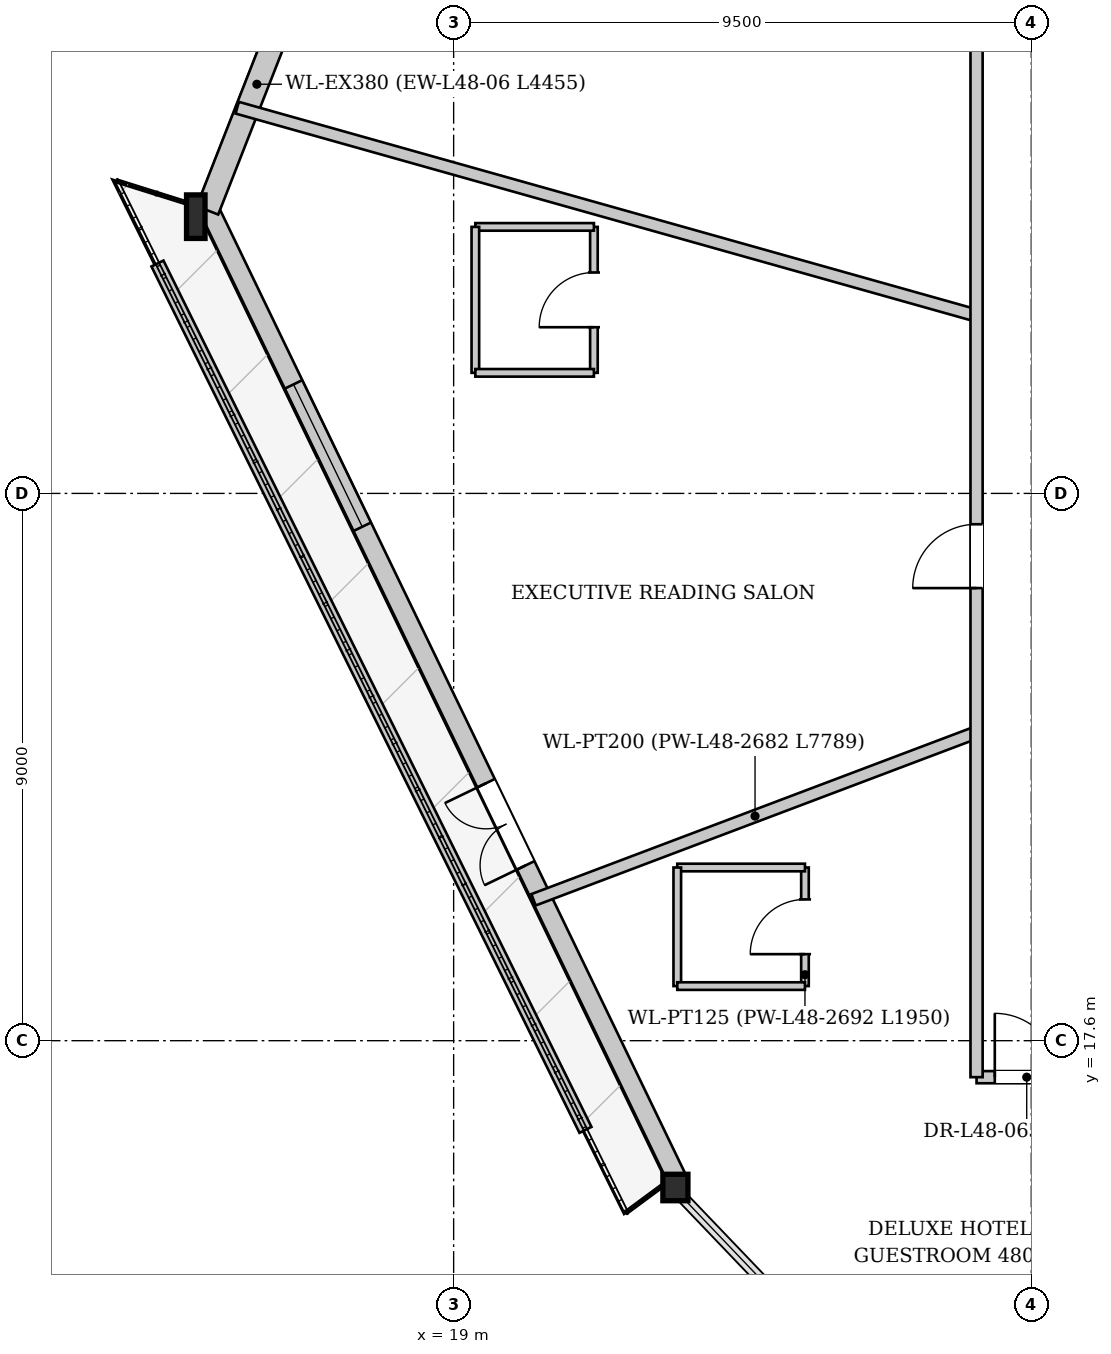
"""IFC4 building model, lengths in metres.
Left out: names, types, materials, properties, quantities, classifications, styles, units other than length and angle.
Written with IfcOpenShell. Run it as: python <this file> out.ifc"""

import sys

from ifc_helpers import new_model, si_unit, direction, frame, frame_2d, origin, origin_2d, place, context, subcontext, project, spatial, rectangle, i_section, extrude, source, transform, mapped, element, fill, save


model = new_model("IFC4")
c1 = context("Model", 3, precision=1e-05, world=origin(), true_north=direction((0.0, 1.0)))
c2 = subcontext(c1, "Body", "Model", "MODEL_VIEW")
j1 = project(units=[si_unit("LENGTHUNIT", "METRE"), si_unit("PLANEANGLEUNIT", "RADIAN")], contexts=[c1])
p1 = place(None, origin())
s1 = spatial("IfcSite", under=j1, at=p1, CompositionType="ELEMENT")
p2 = place(p1, origin())
s2 = spatial("IfcBuilding", under=s1, at=p2, CompositionType="ELEMENT")
p3 = place(p2, frame((0.0, 0.0, 182.1)))
s3 = spatial("IfcBuildingStorey", under=s2, at=p3, CompositionType="ELEMENT", Elevation=182.1)
m1 = source(origin(), c2, "Body", "SweptSolid", [
    extrude(i_section(OverallWidth=0.304, OverallDepth=0.716, WebThickness=0.021, FlangeThickness=0.04, at=origin_2d()), origin(), (0.0, 0.0, 1.0), 3.403),
])
p4 = place(p3, frame((14.774, 31.325, 0.0), z_axis=(-0.008968101403, -0.102021121565, 0.994741807663), x_axis=(0.996158659499, -0.087566689478, 0.0)))
e1 = element("IfcColumn", 1, at=p4, inside=s3, PredefinedType="COLUMN", context=c2, shape_type="MappedRepresentation", body=[
    mapped(m1, transform((0.0, 0.0, 0.0), x_axis=(1.0, 0.0, 0.0), y_axis=(0.0, 1.0, 0.0), z_axis=(0.0, 0.0, 1.0), scale=1.0)),
])
m2 = source(origin(), c2, "Body", "SweptSolid", [
    extrude(i_section(OverallWidth=0.412, OverallDepth=0.435, WebThickness=0.031, FlangeThickness=0.05, at=origin_2d()), origin(), (0.0, 0.0, 1.0), 3.4),
])
p5 = place(p3, frame((22.519, 15.279, 0.0), z_axis=(0.07518697246, -0.054648792781, 0.995670843512), x_axis=(0.587941984646, 0.808903098455, 0.0)))
e2 = element("IfcColumn", 2, at=p5, inside=s3, PredefinedType="COLUMN", context=c2, shape_type="MappedRepresentation", body=[
    mapped(m2, transform((0.0, 0.0, 0.0), x_axis=(1.0, 0.0, 0.0), y_axis=(0.0, 1.0, 0.0), z_axis=(0.0, 0.0, 1.0), scale=1.0)),
])
p6 = place(p3, frame((22.664, 15.348, 0.0), z_axis=(0.0, 0.0, 1.0), x_axis=(-0.434690054068, 0.900580122418, 0.0)))
e3 = element("IfcWall", 3, at=p6, inside=s3, PredefinedType="SOLIDWALL", context=c2, shape_type="SweptSolid", body=[
    extrude(rectangle(XDim=17.818, YDim=0.32, at=frame_2d((8.909, 0.0))), origin(), (0.0, 0.0, 1.0), 2.722),
])
p7 = place(p6, frame((5.702, 0.0, 0.0)))
e4 = element("IfcOpeningElement", 4, at=p7, cuts=e3, PredefinedType="OPENING", context=c2, shape_type="SweptSolid", body=[
    extrude(rectangle(XDim=1.5, YDim=2.3, at=frame_2d((0.75, 1.15))), frame((0.0, 0.17, 0.0), z_axis=(0.0, -1.0, 0.0), x_axis=(1.0, 0.0, 0.0)), (0.0, 0.0, 1.0), 0.34),
])
p8 = place(p6, frame((11.885, 0.0, 0.252)))
e5 = element("IfcOpeningElement", 5, at=p8, cuts=e3, PredefinedType="OPENING", context=c2, shape_type="SweptSolid", body=[
    extrude(rectangle(XDim=2.6, YDim=2.35, at=frame_2d((1.3, 1.175))), frame((0.0, 0.17, 0.0), z_axis=(0.0, -1.0, 0.0), x_axis=(1.0, 0.0, 0.0)), (0.0, 0.0, 1.0), 0.34),
])
p9 = place(p3, frame((14.951, 31.255, 0.0), z_axis=(0.0, 0.0, 1.0), x_axis=(0.364851869686, 0.931065579423, 0.0)))
e6 = element("IfcWall", 6, at=p9, inside=s3, PredefinedType="SOLIDWALL", context=c2, shape_type="SweptSolid", body=[
    extrude(rectangle(XDim=4.455, YDim=0.38, at=frame_2d((2.227, 0.0))), origin(), (0.0, 0.0, 1.0), 2.722),
])
p10 = place(p3, frame((14.129, 30.381, 0.0), z_axis=(0.0, 0.0, 1.0), x_axis=(0.442956113231, -0.896543296083, 0.0)))
e7 = element("IfcWall", 7, at=p10, inside=s3, PredefinedType="PARAPET", context=c2, shape_type="SweptSolid", body=[
    extrude(rectangle(XDim=15.892, YDim=0.22, at=frame_2d((7.946, 0.0))), origin(), (0.0, 0.0, 1.0), 0.3),
])
p11 = place(p3, frame((27.6, 22.67, 0.0), z_axis=(0.0, 0.0, 1.0), x_axis=(-0.935445148769, -0.353471885225, 0.0)))
e8 = element("IfcWall", 8, at=p11, inside=s3, PredefinedType="PARTITIONING", context=c2, shape_type="SweptSolid", body=[
    extrude(rectangle(XDim=7.789, YDim=0.2, at=frame_2d((3.895, 0.0))), origin(), (0.0, 0.0, 1.0), 3.33),
])
p12 = place(p3, frame((31.791, 17.0, 0.0), z_axis=(0.0, 0.0, 1.0), x_axis=(-0.543103391012, -0.839665830358, 0.0)))
e9 = element("IfcWall", 9, at=p12, inside=s3, PredefinedType="PARTITIONING", context=c2, shape_type="SweptSolid", body=[
    extrude(rectangle(XDim=8.078, YDim=0.2, at=frame_2d((4.039, 0.0))), origin(), (0.0, 0.0, 1.0), 3.33),
])
p13 = place(p3, frame((27.6, 29.524, 0.0), z_axis=(0.0, 0.0, 1.0), x_axis=(-0.962669357106, 0.270680085873, 0.0)))
e10 = element("IfcWall", 10, at=p13, inside=s3, PredefinedType="PARTITIONING", context=c2, shape_type="SweptSolid", body=[
    extrude(rectangle(XDim=12.631, YDim=0.2, at=frame_2d((6.315, 0.0))), origin(), (0.0, 0.0, 1.0), 3.33),
])
p14 = place(p3, frame((24.778, 18.498, 0.0), z_axis=(0.0, 0.0, 1.0), x_axis=(0.0, 1.0, 0.0)))
e11 = element("IfcWall", 11, at=p14, inside=s3, PredefinedType="PARTITIONING", context=c2, shape_type="SweptSolid", body=[
    extrude(rectangle(XDim=1.95, YDim=0.125, at=frame_2d((0.975, 0.0))), origin(), (0.0, 0.0, 1.0), 3.015),
])
p15 = place(p14, frame((0.525, 0.0, 0.0)))
e12 = element("IfcOpeningElement", 12, at=p15, cuts=e11, PredefinedType="OPENING", context=c2, shape_type="SweptSolid", body=[
    extrude(rectangle(XDim=0.9, YDim=2.1, at=frame_2d((0.45, 1.05))), frame((0.0, 0.073, 0.0), z_axis=(0.0, -1.0, 0.0), x_axis=(1.0, 0.0, 0.0)), (0.0, 0.0, 1.0), 0.145),
])
p16 = place(p3, frame((24.778, 20.448, 0.0), z_axis=(0.0, 0.0, 1.0), x_axis=(-1.0, 0.0, 0.0)))
e13 = element("IfcWall", 13, at=p16, inside=s3, PredefinedType="PARTITIONING", context=c2, shape_type="SweptSolid", body=[
    extrude(rectangle(XDim=2.1, YDim=0.125, at=frame_2d((1.05, 0.0))), origin(), (0.0, 0.0, 1.0), 3.33),
])
p17 = place(p3, frame((22.678, 20.448, 0.0), z_axis=(0.0, 0.0, 1.0), x_axis=(0.0, -1.0, 0.0)))
e14 = element("IfcWall", 14, at=p17, inside=s3, PredefinedType="PARTITIONING", context=c2, shape_type="SweptSolid", body=[
    extrude(rectangle(XDim=1.95, YDim=0.125, at=frame_2d((0.975, 0.0))), origin(), (0.0, 0.0, 1.0), 3.33),
])
p18 = place(p3, frame((22.678, 18.498, 0.0), z_axis=(0.0, 0.0, 1.0), x_axis=(1.0, 0.0, 0.0)))
e15 = element("IfcWall", 15, at=p18, inside=s3, PredefinedType="PARTITIONING", context=c2, shape_type="SweptSolid", body=[
    extrude(rectangle(XDim=2.1, YDim=0.125, at=frame_2d((1.05, 0.0))), origin(), (0.0, 0.0, 1.0), 3.33),
])
p19 = place(p3, frame((21.307, 28.583, 0.0), z_axis=(0.0, 0.0, 1.0), x_axis=(0.0, 1.0, 0.0)))
e16 = element("IfcWall", 16, at=p19, inside=s3, PredefinedType="PARTITIONING", context=c2, shape_type="SweptSolid", body=[
    extrude(rectangle(XDim=2.4, YDim=0.125, at=frame_2d((1.2, 0.0))), origin(), (0.0, 0.0, 1.0), 3.015),
])
p20 = place(p19, frame((0.75, 0.0, 0.0)))
e17 = element("IfcOpeningElement", 17, at=p20, cuts=e16, PredefinedType="OPENING", context=c2, shape_type="SweptSolid", body=[
    extrude(rectangle(XDim=0.9, YDim=2.1, at=frame_2d((0.45, 1.05))), frame((0.0, 0.073, 0.0), z_axis=(0.0, -1.0, 0.0), x_axis=(1.0, 0.0, 0.0)), (0.0, 0.0, 1.0), 0.145),
])
p21 = place(p3, frame((21.307, 30.983, 0.0), z_axis=(0.0, 0.0, 1.0), x_axis=(-1.0, 0.0, 0.0)))
e18 = element("IfcWall", 18, at=p21, inside=s3, PredefinedType="PARTITIONING", context=c2, shape_type="SweptSolid", body=[
    extrude(rectangle(XDim=1.95, YDim=0.125, at=frame_2d((0.975, 0.0))), origin(), (0.0, 0.0, 1.0), 3.33),
])
p22 = place(p3, frame((19.357, 30.983, 0.0), z_axis=(0.0, 0.0, 1.0), x_axis=(0.0, -1.0, 0.0)))
e19 = element("IfcWall", 19, at=p22, inside=s3, PredefinedType="PARTITIONING", context=c2, shape_type="SweptSolid", body=[
    extrude(rectangle(XDim=2.4, YDim=0.125, at=frame_2d((1.2, 0.0))), origin(), (0.0, 0.0, 1.0), 3.33),
])
p23 = place(p3, frame((19.357, 28.583, 0.0), z_axis=(0.0, 0.0, 1.0), x_axis=(1.0, 0.0, 0.0)))
e20 = element("IfcWall", 20, at=p23, inside=s3, PredefinedType="PARTITIONING", context=c2, shape_type="SweptSolid", body=[
    extrude(rectangle(XDim=1.95, YDim=0.125, at=frame_2d((0.975, 0.0))), origin(), (0.0, 0.0, 1.0), 3.33),
])
p24 = place(p3, frame((27.6, 17.0, 0.0), z_axis=(0.0, 0.0, 1.0), x_axis=(1.0, 0.0, 0.0)))
e21 = element("IfcWall", 21, at=p24, inside=s3, PredefinedType="PARTITIONING", context=c2, shape_type="SweptSolid", body=[
    extrude(rectangle(XDim=20.8, YDim=0.2, at=frame_2d((10.4, 0.0))), origin(), (0.0, 0.0, 1.0), 3.33),
])
p25 = place(p24, frame((0.3, 0.0, 0.0)))
e22 = element("IfcOpeningElement", 22, at=p25, cuts=e21, PredefinedType="OPENING", context=c2, shape_type="SweptSolid", body=[
    extrude(rectangle(XDim=1.05, YDim=2.2, at=frame_2d((0.525, 1.1))), frame((0.0, 0.11, 0.0), z_axis=(0.0, -1.0, 0.0), x_axis=(1.0, 0.0, 0.0)), (0.0, 0.0, 1.0), 0.22),
])
p26 = place(p24, frame((6.215, 0.0, 0.0)))
e23 = element("IfcOpeningElement", 23, at=p26, cuts=e21, PredefinedType="OPENING", context=c2, shape_type="SweptSolid", body=[
    extrude(rectangle(XDim=1.05, YDim=2.2, at=frame_2d((0.525, 1.1))), frame((0.0, 0.11, 0.0), z_axis=(0.0, -1.0, 0.0), x_axis=(1.0, 0.0, 0.0)), (0.0, 0.0, 1.0), 0.22),
])
p27 = place(p24, frame((14.998, 0.0, 0.0)))
e24 = element("IfcOpeningElement", 24, at=p27, cuts=e21, PredefinedType="OPENING", context=c2, shape_type="SweptSolid", body=[
    extrude(rectangle(XDim=1.05, YDim=2.2, at=frame_2d((0.525, 1.1))), frame((0.0, 0.11, 0.0), z_axis=(0.0, -1.0, 0.0), x_axis=(1.0, 0.0, 0.0)), (0.0, 0.0, 1.0), 0.22),
])
p28 = place(p24, frame((19.45, 0.0, 0.0)))
e25 = element("IfcOpeningElement", 25, at=p28, cuts=e21, PredefinedType="OPENING", context=c2, shape_type="SweptSolid", body=[
    extrude(rectangle(XDim=1.05, YDim=2.2, at=frame_2d((0.525, 1.1))), frame((0.0, 0.11, 0.0), z_axis=(0.0, -1.0, 0.0), x_axis=(1.0, 0.0, 0.0)), (0.0, 0.0, 1.0), 0.22),
])
p29 = place(p3, frame((27.6, 17.0, 0.0), z_axis=(0.0, 0.0, 1.0), x_axis=(0.0, 1.0, 0.0)))
e26 = element("IfcWall", 26, at=p29, inside=s3, PredefinedType="PARTITIONING", context=c2, shape_type="SweptSolid", body=[
    extrude(rectangle(XDim=19.2, YDim=0.2, at=frame_2d((9.6, 0.0))), origin(), (0.0, 0.0, 1.0), 3.33),
])
p30 = place(p29, frame((17.85, 0.0, 0.0)))
e27 = element("IfcOpeningElement", 27, at=p30, cuts=e26, PredefinedType="OPENING", context=c2, shape_type="SweptSolid", body=[
    extrude(rectangle(XDim=1.05, YDim=2.2, at=frame_2d((0.525, 1.1))), frame((0.0, 0.11, 0.0), z_axis=(0.0, -1.0, 0.0), x_axis=(1.0, 0.0, 0.0)), (0.0, 0.0, 1.0), 0.22),
])
p31 = place(p29, frame((8.043, 0.0, 0.0)))
e28 = element("IfcOpeningElement", 28, at=p31, cuts=e26, PredefinedType="OPENING", context=c2, shape_type="SweptSolid", body=[
    extrude(rectangle(XDim=1.05, YDim=2.2, at=frame_2d((0.525, 1.1))), frame((0.0, 0.11, 0.0), z_axis=(0.0, -1.0, 0.0), x_axis=(1.0, 0.0, 0.0)), (0.0, 0.0, 1.0), 0.22),
])
m3 = source(origin(), c2, "Body", "SweptSolid", [
    extrude(rectangle(XDim=1.5, YDim=2.3, at=frame_2d((0.75, 1.15))), frame((0.0, 0.025, 0.0), z_axis=(0.0, -1.0, 0.0), x_axis=(1.0, 0.0, 0.0)), (0.0, 0.0, 1.0), 0.05),
])
p32 = place(p7, origin())
e29 = element("IfcDoor", 29, at=p32, inside=s3, OperationType="DOUBLE_DOOR_SINGLE_SWING", PredefinedType="DOOR", context=c2, shape_type="MappedRepresentation", body=[
    mapped(m3, transform((0.0, 0.0, 0.0), x_axis=(1.0, 0.0, 0.0), y_axis=(0.0, 1.0, 0.0), z_axis=(0.0, 0.0, 1.0), scale=1.0)),
])
fill(e4, e29)
m4 = source(origin(), c2, "Body", "SweptSolid", [
    extrude(rectangle(XDim=2.6, YDim=2.35, at=frame_2d((1.3, 1.175))), frame((0.0, 0.03, 0.0), z_axis=(0.0, -1.0, 0.0), x_axis=(1.0, 0.0, 0.0)), (0.0, 0.0, 1.0), 0.06),
])
p33 = place(p8, origin())
e30 = element("IfcWindow", 30, at=p33, inside=s3, PartitioningType="SINGLE_PANEL", PredefinedType="WINDOW", context=c2, shape_type="MappedRepresentation", body=[
    mapped(m4, transform((0.0, 0.0, 0.0), x_axis=(1.0, 0.0, 0.0), y_axis=(0.0, 1.0, 0.0), z_axis=(0.0, 0.0, 1.0), scale=1.0)),
])
fill(e5, e30)
m5 = source(origin(), c2, "Body", "SweptSolid", [
    extrude(rectangle(XDim=0.9, YDim=2.1, at=frame_2d((0.45, 1.05))), frame((0.0, 0.025, 0.0), z_axis=(0.0, -1.0, 0.0), x_axis=(1.0, 0.0, 0.0)), (0.0, 0.0, 1.0), 0.05),
])
p34 = place(p15, origin())
e31 = element("IfcDoor", 31, at=p34, inside=s3, OperationType="SINGLE_SWING_LEFT", PredefinedType="DOOR", context=c2, shape_type="MappedRepresentation", body=[
    mapped(m5, transform((0.0, 0.0, 0.0), x_axis=(1.0, 0.0, 0.0), y_axis=(0.0, 1.0, 0.0), z_axis=(0.0, 0.0, 1.0), scale=1.0)),
])
fill(e12, e31)
p35 = place(p20, origin())
e32 = element("IfcDoor", 32, at=p35, inside=s3, OperationType="SINGLE_SWING_LEFT", PredefinedType="DOOR", context=c2, shape_type="MappedRepresentation", body=[
    mapped(m5, transform((0.0, 0.0, 0.0), x_axis=(1.0, 0.0, 0.0), y_axis=(0.0, 1.0, 0.0), z_axis=(0.0, 0.0, 1.0), scale=1.0)),
])
fill(e17, e32)
m6 = source(origin(), c2, "Body", "SweptSolid", [
    extrude(rectangle(XDim=1.05, YDim=2.2, at=frame_2d((0.525, 1.1))), frame((0.0, 0.025, 0.0), z_axis=(0.0, -1.0, 0.0), x_axis=(1.0, 0.0, 0.0)), (0.0, 0.0, 1.0), 0.05),
])
p36 = place(p25, origin())
e33 = element("IfcDoor", 33, at=p36, inside=s3, OperationType="SINGLE_SWING_LEFT", PredefinedType="DOOR", context=c2, shape_type="MappedRepresentation", body=[
    mapped(m6, transform((0.0, 0.0, 0.0), x_axis=(1.0, 0.0, 0.0), y_axis=(0.0, 1.0, 0.0), z_axis=(0.0, 0.0, 1.0), scale=1.0)),
])
fill(e22, e33)
p37 = place(p31, origin())
e34 = element("IfcDoor", 34, at=p37, inside=s3, OperationType="SINGLE_SWING_LEFT", PredefinedType="DOOR", context=c2, shape_type="MappedRepresentation", body=[
    mapped(m6, transform((0.0, 0.0, 0.0), x_axis=(1.0, 0.0, 0.0), y_axis=(0.0, 1.0, 0.0), z_axis=(0.0, 0.0, 1.0), scale=1.0)),
])
fill(e28, e34)
save(model, sys.argv[1])
